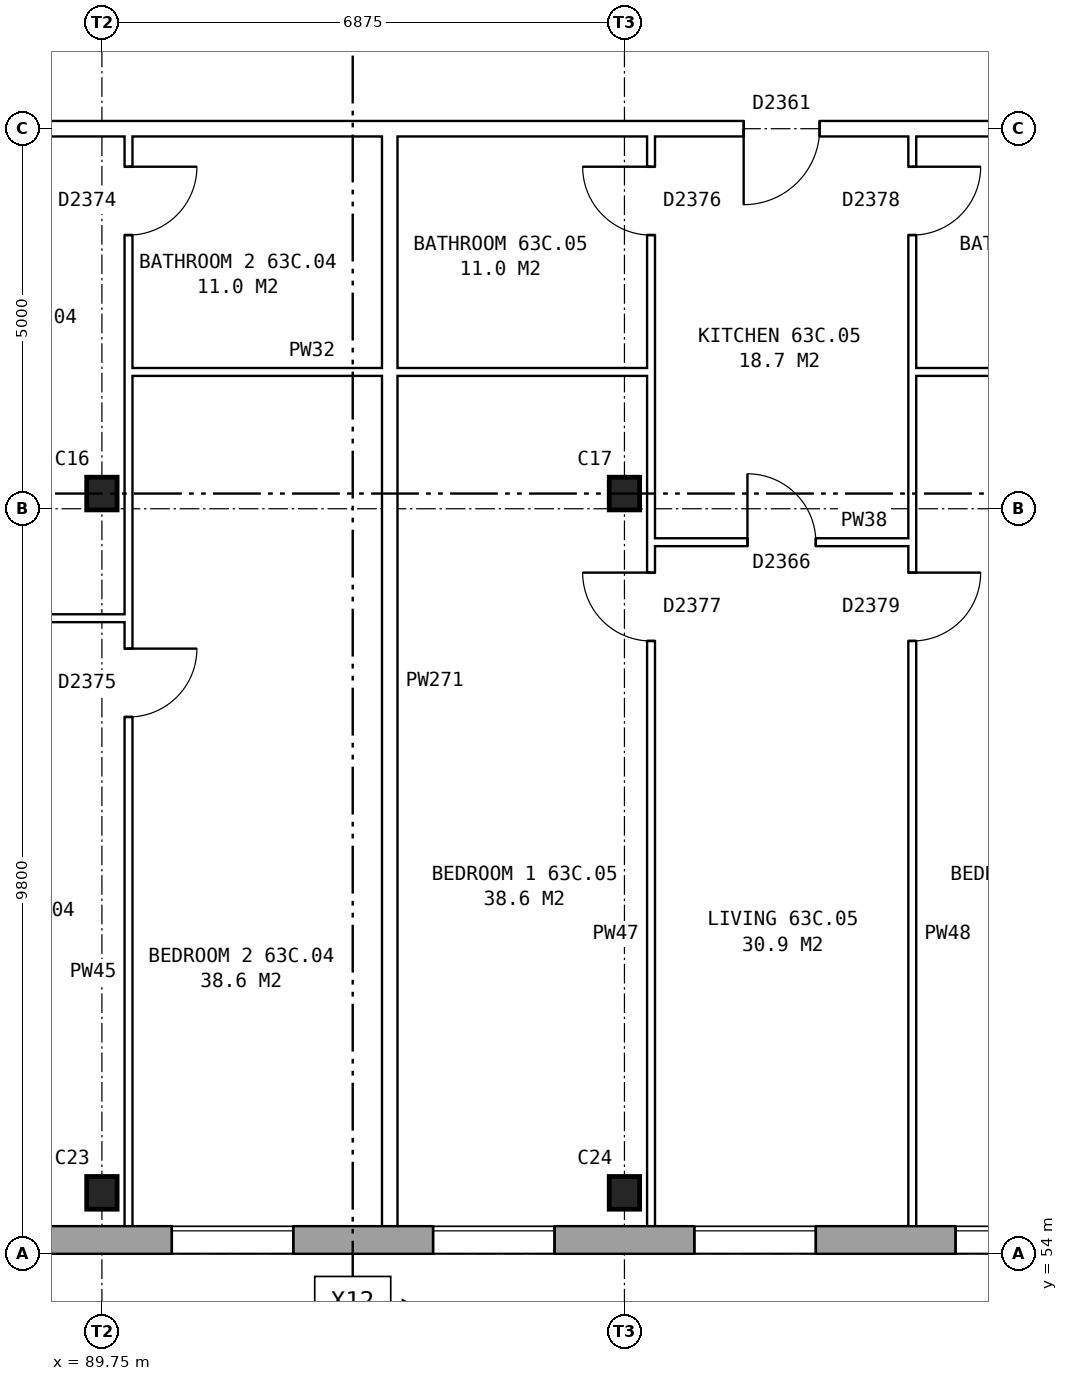
"""IFC4 building model, lengths in metres.
Left out: names, types, materials, properties, quantities, classifications, styles, units other than length and angle.
Written with IfcOpenShell. Run it as: python <this file> out.ifc"""

import sys

from ifc_helpers import new_model, si_unit, direction, frame, frame_2d, origin, origin_2d, place, context, subcontext, project, spatial, rectangle, i_section, extrude, element, fill, save


model = new_model("IFC4")
c1 = context("Model", 3, precision=1e-05, world=origin(), true_north=direction((0.0, 1.0)))
c2 = subcontext(c1, "Body", "Model", "MODEL_VIEW")
j1 = project(units=[si_unit("LENGTHUNIT", "METRE"), si_unit("PLANEANGLEUNIT", "RADIAN")], contexts=[c1])
p1 = place(None, origin())
s1 = spatial("IfcSite", under=j1, at=p1, CompositionType="ELEMENT")
p2 = place(p1, origin())
s2 = spatial("IfcBuilding", under=s1, at=p2, CompositionType="ELEMENT")
p3 = place(p2, frame((0.0, 0.0, 224.5)))
s3 = spatial("IfcBuildingStorey", under=s2, at=p3, CompositionType="ELEMENT", Elevation=224.5)
for number, where, z_axis, x_axis in (
    (1, (89.75, 54.8, 0.0), (0.0, 0.0, 1.0), (1.0, 0.0, 0.0)),
    (2, (96.625, 54.8, 0.0), (0.0, 0.0, 1.0), (1.0, 0.0, 0.0)),
    (3, (89.75, 64.0, 0.0), (0.0, 0.0, 1.0), (1.0, 0.0, 0.0)),
    (4, (96.625, 64.0, 0.0), (0.0, 0.0, 1.0), (1.0, 0.0, 0.0)),
):
    element("IfcColumn", number, at=place(p3, frame(where, z_axis=z_axis, x_axis=x_axis)), inside=s3, PredefinedType="COLUMN", context=c2, shape_type="SweptSolid", body=[
        extrude(i_section(OverallWidth=0.4, OverallDepth=0.43, WebThickness=0.04, FlangeThickness=0.04, at=origin_2d()), origin(), (0.0, 0.0, 1.0), 2.85),
    ])
p4 = place(p3, frame((75.95, 54.18, 0.0), z_axis=(0.0, 0.0, 1.0), x_axis=(1.0, 0.0, 0.0)))
e5 = element("IfcWall", 5, at=p4, inside=s3, PredefinedType="STANDARD", context=c2, shape_type="SweptSolid", body=[
    extrude(rectangle(XDim=55.1, YDim=0.36, at=frame_2d((27.55, 0.0))), origin(), (0.0, 0.0, 1.0), 2.85),
])
p5 = place(p4, frame((0.969, 0.0, 0.8)))
e6 = element("IfcOpeningElement", 6, at=p5, cuts=e5, PredefinedType="OPENING", context=c2, shape_type="SweptSolid", body=[
    extrude(rectangle(XDim=1.6, YDim=1.8, at=frame_2d((0.8, 0.9))), frame((0.0, 0.19, 0.0), z_axis=(0.0, -1.0, 0.0), x_axis=(1.0, 0.0, 0.0)), (0.0, 0.0, 1.0), 0.38),
])
p6 = place(p4, frame((4.406, 0.0, 0.8)))
e7 = element("IfcOpeningElement", 7, at=p6, cuts=e5, PredefinedType="OPENING", context=c2, shape_type="SweptSolid", body=[
    extrude(rectangle(XDim=1.6, YDim=1.8, at=frame_2d((0.8, 0.9))), frame((0.0, 0.19, 0.0), z_axis=(0.0, -1.0, 0.0), x_axis=(1.0, 0.0, 0.0)), (0.0, 0.0, 1.0), 0.38),
])
p7 = place(p4, frame((7.844, 0.0, 0.8)))
e8 = element("IfcOpeningElement", 8, at=p7, cuts=e5, PredefinedType="OPENING", context=c2, shape_type="SweptSolid", body=[
    extrude(rectangle(XDim=1.6, YDim=1.8, at=frame_2d((0.8, 0.9))), frame((0.0, 0.19, 0.0), z_axis=(0.0, -1.0, 0.0), x_axis=(1.0, 0.0, 0.0)), (0.0, 0.0, 1.0), 0.38),
])
p8 = place(p4, frame((11.281, 0.0, 0.8)))
e9 = element("IfcOpeningElement", 9, at=p8, cuts=e5, PredefinedType="OPENING", context=c2, shape_type="SweptSolid", body=[
    extrude(rectangle(XDim=1.6, YDim=1.8, at=frame_2d((0.8, 0.9))), frame((0.0, 0.19, 0.0), z_axis=(0.0, -1.0, 0.0), x_axis=(1.0, 0.0, 0.0)), (0.0, 0.0, 1.0), 0.38),
])
p9 = place(p4, frame((14.719, 0.0, 0.8)))
e10 = element("IfcOpeningElement", 10, at=p9, cuts=e5, PredefinedType="OPENING", context=c2, shape_type="SweptSolid", body=[
    extrude(rectangle(XDim=1.6, YDim=1.8, at=frame_2d((0.8, 0.9))), frame((0.0, 0.19, 0.0), z_axis=(0.0, -1.0, 0.0), x_axis=(1.0, 0.0, 0.0)), (0.0, 0.0, 1.0), 0.38),
])
p10 = place(p4, frame((18.156, 0.0, 0.8)))
e11 = element("IfcOpeningElement", 11, at=p10, cuts=e5, PredefinedType="OPENING", context=c2, shape_type="SweptSolid", body=[
    extrude(rectangle(XDim=1.6, YDim=1.8, at=frame_2d((0.8, 0.9))), frame((0.0, 0.19, 0.0), z_axis=(0.0, -1.0, 0.0), x_axis=(1.0, 0.0, 0.0)), (0.0, 0.0, 1.0), 0.38),
])
p11 = place(p4, frame((21.594, 0.0, 0.8)))
e12 = element("IfcOpeningElement", 12, at=p11, cuts=e5, PredefinedType="OPENING", context=c2, shape_type="SweptSolid", body=[
    extrude(rectangle(XDim=1.6, YDim=1.8, at=frame_2d((0.8, 0.9))), frame((0.0, 0.19, 0.0), z_axis=(0.0, -1.0, 0.0), x_axis=(1.0, 0.0, 0.0)), (0.0, 0.0, 1.0), 0.38),
])
p12 = place(p4, frame((25.031, 0.0, 0.8)))
e13 = element("IfcOpeningElement", 13, at=p12, cuts=e5, PredefinedType="OPENING", context=c2, shape_type="SweptSolid", body=[
    extrude(rectangle(XDim=1.6, YDim=1.8, at=frame_2d((0.8, 0.9))), frame((0.0, 0.19, 0.0), z_axis=(0.0, -1.0, 0.0), x_axis=(1.0, 0.0, 0.0)), (0.0, 0.0, 1.0), 0.38),
])
p13 = place(p4, frame((28.469, 0.0, 0.8)))
e14 = element("IfcOpeningElement", 14, at=p13, cuts=e5, PredefinedType="OPENING", context=c2, shape_type="SweptSolid", body=[
    extrude(rectangle(XDim=1.6, YDim=1.8, at=frame_2d((0.8, 0.9))), frame((0.0, 0.19, 0.0), z_axis=(0.0, -1.0, 0.0), x_axis=(1.0, 0.0, 0.0)), (0.0, 0.0, 1.0), 0.38),
])
p14 = place(p4, frame((31.906, 0.0, 0.8)))
e15 = element("IfcOpeningElement", 15, at=p14, cuts=e5, PredefinedType="OPENING", context=c2, shape_type="SweptSolid", body=[
    extrude(rectangle(XDim=1.6, YDim=1.8, at=frame_2d((0.8, 0.9))), frame((0.0, 0.19, 0.0), z_axis=(0.0, -1.0, 0.0), x_axis=(1.0, 0.0, 0.0)), (0.0, 0.0, 1.0), 0.38),
])
p15 = place(p4, frame((35.344, 0.0, 0.8)))
e16 = element("IfcOpeningElement", 16, at=p15, cuts=e5, PredefinedType="OPENING", context=c2, shape_type="SweptSolid", body=[
    extrude(rectangle(XDim=1.6, YDim=1.8, at=frame_2d((0.8, 0.9))), frame((0.0, 0.19, 0.0), z_axis=(0.0, -1.0, 0.0), x_axis=(1.0, 0.0, 0.0)), (0.0, 0.0, 1.0), 0.38),
])
p16 = place(p4, frame((38.781, 0.0, 0.8)))
e17 = element("IfcOpeningElement", 17, at=p16, cuts=e5, PredefinedType="OPENING", context=c2, shape_type="SweptSolid", body=[
    extrude(rectangle(XDim=1.6, YDim=1.8, at=frame_2d((0.8, 0.9))), frame((0.0, 0.19, 0.0), z_axis=(0.0, -1.0, 0.0), x_axis=(1.0, 0.0, 0.0)), (0.0, 0.0, 1.0), 0.38),
])
p17 = place(p4, frame((42.219, 0.0, 0.8)))
e18 = element("IfcOpeningElement", 18, at=p17, cuts=e5, PredefinedType="OPENING", context=c2, shape_type="SweptSolid", body=[
    extrude(rectangle(XDim=1.6, YDim=1.8, at=frame_2d((0.8, 0.9))), frame((0.0, 0.19, 0.0), z_axis=(0.0, -1.0, 0.0), x_axis=(1.0, 0.0, 0.0)), (0.0, 0.0, 1.0), 0.38),
])
p18 = place(p4, frame((45.656, 0.0, 0.8)))
e19 = element("IfcOpeningElement", 19, at=p18, cuts=e5, PredefinedType="OPENING", context=c2, shape_type="SweptSolid", body=[
    extrude(rectangle(XDim=1.6, YDim=1.8, at=frame_2d((0.8, 0.9))), frame((0.0, 0.19, 0.0), z_axis=(0.0, -1.0, 0.0), x_axis=(1.0, 0.0, 0.0)), (0.0, 0.0, 1.0), 0.38),
])
p19 = place(p4, frame((49.094, 0.0, 0.8)))
e20 = element("IfcOpeningElement", 20, at=p19, cuts=e5, PredefinedType="OPENING", context=c2, shape_type="SweptSolid", body=[
    extrude(rectangle(XDim=1.6, YDim=1.8, at=frame_2d((0.8, 0.9))), frame((0.0, 0.19, 0.0), z_axis=(0.0, -1.0, 0.0), x_axis=(1.0, 0.0, 0.0)), (0.0, 0.0, 1.0), 0.38),
])
p20 = place(p4, frame((52.531, 0.0, 0.8)))
e21 = element("IfcOpeningElement", 21, at=p20, cuts=e5, PredefinedType="OPENING", context=c2, shape_type="SweptSolid", body=[
    extrude(rectangle(XDim=1.6, YDim=1.8, at=frame_2d((0.8, 0.9))), frame((0.0, 0.19, 0.0), z_axis=(0.0, -1.0, 0.0), x_axis=(1.0, 0.0, 0.0)), (0.0, 0.0, 1.0), 0.38),
])
p21 = place(p3, frame((86.662, 62.36, 0.0), z_axis=(0.0, 0.0, 1.0), x_axis=(1.0, 0.0, 0.0)))
e22 = element("IfcWall", 22, at=p21, inside=s3, PredefinedType="PARTITIONING", context=c2, shape_type="SweptSolid", body=[
    extrude(rectangle(XDim=3.438, YDim=0.1, at=frame_2d((1.719, 0.0))), origin(), (0.0, 0.0, 1.0), 2.85),
])
p22 = place(p21, frame((1.269, 0.0, 0.0)))
e23 = element("IfcOpeningElement", 23, at=p22, cuts=e22, PredefinedType="OPENING", context=c2, shape_type="SweptSolid", body=[
    extrude(rectangle(XDim=0.9, YDim=2.1, at=frame_2d((0.45, 1.05))), frame((0.0, 0.06, 0.0), z_axis=(0.0, -1.0, 0.0), x_axis=(1.0, 0.0, 0.0)), (0.0, 0.0, 1.0), 0.12),
])
p23 = place(p3, frame((96.975, 63.36, 0.0), z_axis=(0.0, 0.0, 1.0), x_axis=(1.0, 0.0, 0.0)))
e24 = element("IfcWall", 24, at=p23, inside=s3, PredefinedType="PARTITIONING", context=c2, shape_type="SweptSolid", body=[
    extrude(rectangle(XDim=3.437, YDim=0.1, at=frame_2d((1.719, 0.0))), origin(), (0.0, 0.0, 1.0), 2.85),
])
p24 = place(p23, frame((1.269, 0.0, 0.0)))
e25 = element("IfcOpeningElement", 25, at=p24, cuts=e24, PredefinedType="OPENING", context=c2, shape_type="SweptSolid", body=[
    extrude(rectangle(XDim=0.9, YDim=2.1, at=frame_2d((0.45, 1.05))), frame((0.0, 0.06, 0.0), z_axis=(0.0, -1.0, 0.0), x_axis=(1.0, 0.0, 0.0)), (0.0, 0.0, 1.0), 0.12),
])
for number, where, z_axis, x_axis in (
    (26, (90.1, 65.6, 0.0), (0.0, 0.0, 1.0), (1.0, 0.0, 0.0)),
    (27, (100.412, 65.6, 0.0), (0.0, 0.0, 1.0), (1.0, 0.0, 0.0)),
):
    element("IfcWall", number, at=place(p3, frame(where, z_axis=z_axis, x_axis=x_axis)), inside=s3, PredefinedType="PARTITIONING", context=c2, shape_type="SweptSolid", body=[
        extrude(rectangle(XDim=6.875, YDim=0.1, at=frame_2d((3.438, 0.0))), origin(), (0.0, 0.0, 1.0), 2.85),
    ])
p25 = place(p3, frame((75.64, 68.8, 0.0), z_axis=(0.0, 0.0, 1.0), x_axis=(1.0, 0.0, 0.0)))
e28 = element("IfcWall", 28, at=p25, inside=s3, PredefinedType="PARTITIONING", context=c2, shape_type="SweptSolid", body=[
    extrude(rectangle(XDim=55.72, YDim=0.2, at=frame_2d((27.86, 0.0))), origin(), (0.0, 0.0, 1.0), 2.85),
])
p26 = place(p25, frame((1.399, 0.0, 0.0)))
e29 = element("IfcOpeningElement", 29, at=p26, cuts=e28, PredefinedType="OPENING", context=c2, shape_type="SweptSolid", body=[
    extrude(rectangle(XDim=1.0, YDim=2.1, at=frame_2d((0.5, 1.05))), frame((0.0, 0.11, 0.0), z_axis=(0.0, -1.0, 0.0), x_axis=(1.0, 0.0, 0.0)), (0.0, 0.0, 1.0), 0.22),
])
p27 = place(p25, frame((12.241, 0.0, 0.0)))
e30 = element("IfcOpeningElement", 30, at=p27, cuts=e28, PredefinedType="OPENING", context=c2, shape_type="SweptSolid", body=[
    extrude(rectangle(XDim=1.0, YDim=2.1, at=frame_2d((0.5, 1.05))), frame((0.0, 0.11, 0.0), z_axis=(0.0, -1.0, 0.0), x_axis=(1.0, 0.0, 0.0)), (0.0, 0.0, 1.0), 0.22),
])
p28 = place(p25, frame((22.553, 0.0, 0.0)))
e31 = element("IfcOpeningElement", 31, at=p28, cuts=e28, PredefinedType="OPENING", context=c2, shape_type="SweptSolid", body=[
    extrude(rectangle(XDim=1.0, YDim=2.1, at=frame_2d((0.5, 1.05))), frame((0.0, 0.11, 0.0), z_axis=(0.0, -1.0, 0.0), x_axis=(1.0, 0.0, 0.0)), (0.0, 0.0, 1.0), 0.22),
])
p29 = place(p25, frame((32.866, 0.0, 0.0)))
e32 = element("IfcOpeningElement", 32, at=p29, cuts=e28, PredefinedType="OPENING", context=c2, shape_type="SweptSolid", body=[
    extrude(rectangle(XDim=1.0, YDim=2.1, at=frame_2d((0.5, 1.05))), frame((0.0, 0.11, 0.0), z_axis=(0.0, -1.0, 0.0), x_axis=(1.0, 0.0, 0.0)), (0.0, 0.0, 1.0), 0.22),
])
p30 = place(p25, frame((36.303, 0.0, 0.0)))
e33 = element("IfcOpeningElement", 33, at=p30, cuts=e28, PredefinedType="OPENING", context=c2, shape_type="SweptSolid", body=[
    extrude(rectangle(XDim=1.0, YDim=2.1, at=frame_2d((0.5, 1.05))), frame((0.0, 0.11, 0.0), z_axis=(0.0, -1.0, 0.0), x_axis=(1.0, 0.0, 0.0)), (0.0, 0.0, 1.0), 0.22),
])
p31 = place(p25, frame((46.616, 0.0, 0.0)))
e34 = element("IfcOpeningElement", 34, at=p31, cuts=e28, PredefinedType="OPENING", context=c2, shape_type="SweptSolid", body=[
    extrude(rectangle(XDim=1.0, YDim=2.1, at=frame_2d((0.5, 1.05))), frame((0.0, 0.11, 0.0), z_axis=(0.0, -1.0, 0.0), x_axis=(1.0, 0.0, 0.0)), (0.0, 0.0, 1.0), 0.22),
])
p32 = place(p25, frame((50.053, 0.0, 0.0)))
e35 = element("IfcOpeningElement", 35, at=p32, cuts=e28, PredefinedType="OPENING", context=c2, shape_type="SweptSolid", body=[
    extrude(rectangle(XDim=1.0, YDim=2.1, at=frame_2d((0.5, 1.05))), frame((0.0, 0.11, 0.0), z_axis=(0.0, -1.0, 0.0), x_axis=(1.0, 0.0, 0.0)), (0.0, 0.0, 1.0), 0.22),
])
p33 = place(p3, frame((90.1, 54.36, 0.0), z_axis=(0.0, 0.0, 1.0), x_axis=(0.0, 1.0, 0.0)))
e36 = element("IfcWall", 36, at=p33, inside=s3, PredefinedType="PARTITIONING", context=c2, shape_type="SweptSolid", body=[
    extrude(rectangle(XDim=14.34, YDim=0.1, at=frame_2d((7.17, 0.0))), origin(), (0.0, 0.0, 1.0), 2.85),
])
p34 = place(p33, frame((6.7, 0.0, 0.0)))
e37 = element("IfcOpeningElement", 37, at=p34, cuts=e36, PredefinedType="OPENING", context=c2, shape_type="SweptSolid", body=[
    extrude(rectangle(XDim=0.9, YDim=2.1, at=frame_2d((0.45, 1.05))), frame((0.0, 0.06, 0.0), z_axis=(0.0, -1.0, 0.0), x_axis=(1.0, 0.0, 0.0)), (0.0, 0.0, 1.0), 0.12),
])
p35 = place(p33, frame((13.04, 0.0, 0.0)))
e38 = element("IfcOpeningElement", 38, at=p35, cuts=e36, PredefinedType="OPENING", context=c2, shape_type="SweptSolid", body=[
    extrude(rectangle(XDim=0.9, YDim=2.1, at=frame_2d((0.45, 1.05))), frame((0.0, 0.06, 0.0), z_axis=(0.0, -1.0, 0.0), x_axis=(1.0, 0.0, 0.0)), (0.0, 0.0, 1.0), 0.12),
])
p36 = place(p3, frame((93.537, 54.36, 0.0), z_axis=(0.0, 0.0, 1.0), x_axis=(0.0, 1.0, 0.0)))
e39 = element("IfcWall", 39, at=p36, inside=s3, PredefinedType="PARTITIONING", context=c2, shape_type="SweptSolid", body=[
    extrude(rectangle(XDim=14.34, YDim=0.2, at=frame_2d((7.17, 0.0))), origin(), (0.0, 0.0, 1.0), 2.85),
])
p37 = place(p3, frame((96.975, 54.36, 0.0), z_axis=(0.0, 0.0, 1.0), x_axis=(0.0, 1.0, 0.0)))
e40 = element("IfcWall", 40, at=p37, inside=s3, PredefinedType="PARTITIONING", context=c2, shape_type="SweptSolid", body=[
    extrude(rectangle(XDim=14.34, YDim=0.1, at=frame_2d((7.17, 0.0))), origin(), (0.0, 0.0, 1.0), 2.85),
])
p38 = place(p37, frame((7.7, 0.0, 0.0)))
e41 = element("IfcOpeningElement", 41, at=p38, cuts=e40, PredefinedType="OPENING", context=c2, shape_type="SweptSolid", body=[
    extrude(rectangle(XDim=0.9, YDim=2.1, at=frame_2d((0.45, 1.05))), frame((0.0, 0.06, 0.0), z_axis=(0.0, -1.0, 0.0), x_axis=(1.0, 0.0, 0.0)), (0.0, 0.0, 1.0), 0.12),
])
p39 = place(p37, frame((13.04, 0.0, 0.0)))
e42 = element("IfcOpeningElement", 42, at=p39, cuts=e40, PredefinedType="OPENING", context=c2, shape_type="SweptSolid", body=[
    extrude(rectangle(XDim=0.9, YDim=2.1, at=frame_2d((0.45, 1.05))), frame((0.0, 0.06, 0.0), z_axis=(0.0, -1.0, 0.0), x_axis=(1.0, 0.0, 0.0)), (0.0, 0.0, 1.0), 0.12),
])
p40 = place(p3, frame((100.412, 54.36, 0.0), z_axis=(0.0, 0.0, 1.0), x_axis=(0.0, 1.0, 0.0)))
e43 = element("IfcWall", 43, at=p40, inside=s3, PredefinedType="PARTITIONING", context=c2, shape_type="SweptSolid", body=[
    extrude(rectangle(XDim=14.34, YDim=0.1, at=frame_2d((7.17, 0.0))), origin(), (0.0, 0.0, 1.0), 2.85),
])
p41 = place(p40, frame((7.7, 0.0, 0.0)))
e44 = element("IfcOpeningElement", 44, at=p41, cuts=e43, PredefinedType="OPENING", context=c2, shape_type="SweptSolid", body=[
    extrude(rectangle(XDim=0.9, YDim=2.1, at=frame_2d((0.45, 1.05))), frame((0.0, 0.06, 0.0), z_axis=(0.0, -1.0, 0.0), x_axis=(1.0, 0.0, 0.0)), (0.0, 0.0, 1.0), 0.12),
])
p42 = place(p40, frame((13.04, 0.0, 0.0)))
e45 = element("IfcOpeningElement", 45, at=p42, cuts=e43, PredefinedType="OPENING", context=c2, shape_type="SweptSolid", body=[
    extrude(rectangle(XDim=0.9, YDim=2.1, at=frame_2d((0.45, 1.05))), frame((0.0, 0.06, 0.0), z_axis=(0.0, -1.0, 0.0), x_axis=(1.0, 0.0, 0.0)), (0.0, 0.0, 1.0), 0.12),
])
p43 = place(p9, origin())
e46 = element("IfcWindow", 46, at=p43, inside=s3, PartitioningType="SINGLE_PANEL", PredefinedType="WINDOW", context=c2, shape_type="SweptSolid", body=[
    extrude(rectangle(XDim=1.6, YDim=1.8, at=frame_2d((0.8, 0.9))), frame((0.0, 0.15, 0.0), z_axis=(0.0, -1.0, 0.0), x_axis=(1.0, 0.0, 0.0)), (0.0, 0.0, 1.0), 0.06),
])
fill(e10, e46)
p44 = place(p10, origin())
e47 = element("IfcWindow", 47, at=p44, inside=s3, PartitioningType="SINGLE_PANEL", PredefinedType="WINDOW", context=c2, shape_type="SweptSolid", body=[
    extrude(rectangle(XDim=1.6, YDim=1.8, at=frame_2d((0.8, 0.9))), frame((0.0, 0.15, 0.0), z_axis=(0.0, -1.0, 0.0), x_axis=(1.0, 0.0, 0.0)), (0.0, 0.0, 1.0), 0.06),
])
fill(e11, e47)
p45 = place(p11, origin())
e48 = element("IfcWindow", 48, at=p45, inside=s3, PartitioningType="SINGLE_PANEL", PredefinedType="WINDOW", context=c2, shape_type="SweptSolid", body=[
    extrude(rectangle(XDim=1.6, YDim=1.8, at=frame_2d((0.8, 0.9))), frame((0.0, 0.15, 0.0), z_axis=(0.0, -1.0, 0.0), x_axis=(1.0, 0.0, 0.0)), (0.0, 0.0, 1.0), 0.06),
])
fill(e12, e48)
p46 = place(p12, origin())
e49 = element("IfcWindow", 49, at=p46, inside=s3, PartitioningType="SINGLE_PANEL", PredefinedType="WINDOW", context=c2, shape_type="SweptSolid", body=[
    extrude(rectangle(XDim=1.6, YDim=1.8, at=frame_2d((0.8, 0.9))), frame((0.0, 0.15, 0.0), z_axis=(0.0, -1.0, 0.0), x_axis=(1.0, 0.0, 0.0)), (0.0, 0.0, 1.0), 0.06),
])
fill(e13, e49)
p47 = place(p34, frame((0.9, 0.0, 0.0), z_axis=(0.0, 0.0, 1.0), x_axis=(-1.0, 0.0, 0.0)))
e50 = element("IfcDoor", 50, at=p47, inside=s3, OperationType="SINGLE_SWING_LEFT", PredefinedType="DOOR", context=c2, shape_type="SweptSolid", body=[
    extrude(rectangle(XDim=0.9, YDim=2.1, at=frame_2d((0.45, 1.05))), frame((0.0, 0.025, 0.0), z_axis=(0.0, -1.0, 0.0), x_axis=(1.0, 0.0, 0.0)), (0.0, 0.0, 1.0), 0.05),
])
fill(e37, e50)
p48 = place(p35, frame((0.9, 0.0, 0.0), z_axis=(0.0, 0.0, 1.0), x_axis=(-1.0, 0.0, 0.0)))
e51 = element("IfcDoor", 51, at=p48, inside=s3, OperationType="SINGLE_SWING_LEFT", PredefinedType="DOOR", context=c2, shape_type="SweptSolid", body=[
    extrude(rectangle(XDim=0.9, YDim=2.1, at=frame_2d((0.45, 1.05))), frame((0.0, 0.025, 0.0), z_axis=(0.0, -1.0, 0.0), x_axis=(1.0, 0.0, 0.0)), (0.0, 0.0, 1.0), 0.05),
])
fill(e38, e51)
p49 = place(p38, origin())
e52 = element("IfcDoor", 52, at=p49, inside=s3, OperationType="SINGLE_SWING_RIGHT", PredefinedType="DOOR", context=c2, shape_type="SweptSolid", body=[
    extrude(rectangle(XDim=0.9, YDim=2.1, at=frame_2d((0.45, 1.05))), frame((0.0, 0.025, 0.0), z_axis=(0.0, -1.0, 0.0), x_axis=(1.0, 0.0, 0.0)), (0.0, 0.0, 1.0), 0.05),
])
fill(e41, e52)
p50 = place(p41, frame((0.9, 0.0, 0.0), z_axis=(0.0, 0.0, 1.0), x_axis=(-1.0, 0.0, 0.0)))
e53 = element("IfcDoor", 53, at=p50, inside=s3, OperationType="SINGLE_SWING_LEFT", PredefinedType="DOOR", context=c2, shape_type="SweptSolid", body=[
    extrude(rectangle(XDim=0.9, YDim=2.1, at=frame_2d((0.45, 1.05))), frame((0.0, 0.025, 0.0), z_axis=(0.0, -1.0, 0.0), x_axis=(1.0, 0.0, 0.0)), (0.0, 0.0, 1.0), 0.05),
])
fill(e44, e53)
p51 = place(p28, frame((1.0, 0.0, 0.0), z_axis=(0.0, 0.0, 1.0), x_axis=(-1.0, 0.0, 0.0)))
e54 = element("IfcDoor", 54, at=p51, inside=s3, OperationType="SINGLE_SWING_RIGHT", PredefinedType="DOOR", context=c2, shape_type="SweptSolid", body=[
    extrude(rectangle(XDim=1.0, YDim=2.1, at=frame_2d((0.5, 1.05))), frame((0.0, 0.025, 0.0), z_axis=(0.0, -1.0, 0.0), x_axis=(1.0, 0.0, 0.0)), (0.0, 0.0, 1.0), 0.05),
])
fill(e31, e54)
p52 = place(p24, origin())
e55 = element("IfcDoor", 55, at=p52, inside=s3, OperationType="SINGLE_SWING_LEFT", PredefinedType="DOOR", context=c2, shape_type="SweptSolid", body=[
    extrude(rectangle(XDim=0.9, YDim=2.1, at=frame_2d((0.45, 1.05))), frame((0.0, 0.025, 0.0), z_axis=(0.0, -1.0, 0.0), x_axis=(1.0, 0.0, 0.0)), (0.0, 0.0, 1.0), 0.05),
])
fill(e25, e55)
p53 = place(p39, origin())
e56 = element("IfcDoor", 56, at=p53, inside=s3, OperationType="SINGLE_SWING_RIGHT", PredefinedType="DOOR", context=c2, shape_type="SweptSolid", body=[
    extrude(rectangle(XDim=0.9, YDim=2.1, at=frame_2d((0.45, 1.05))), frame((0.0, 0.025, 0.0), z_axis=(0.0, -1.0, 0.0), x_axis=(1.0, 0.0, 0.0)), (0.0, 0.0, 1.0), 0.05),
])
fill(e42, e56)
p54 = place(p42, frame((0.9, 0.0, 0.0), z_axis=(0.0, 0.0, 1.0), x_axis=(-1.0, 0.0, 0.0)))
e57 = element("IfcDoor", 57, at=p54, inside=s3, OperationType="SINGLE_SWING_LEFT", PredefinedType="DOOR", context=c2, shape_type="SweptSolid", body=[
    extrude(rectangle(XDim=0.9, YDim=2.1, at=frame_2d((0.45, 1.05))), frame((0.0, 0.025, 0.0), z_axis=(0.0, -1.0, 0.0), x_axis=(1.0, 0.0, 0.0)), (0.0, 0.0, 1.0), 0.05),
])
fill(e45, e57)
save(model, sys.argv[1])
